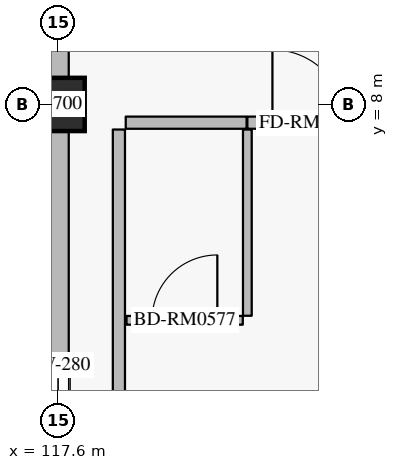
"""IFC4 building model, lengths in metres.
Left out: names, types, materials, properties, quantities, classifications, styles, units other than length and angle.
Written with IfcOpenShell. Run it as: python <this file> out.ifc"""

import sys

from ifc_helpers import new_model, si_unit, direction, frame, frame_2d, origin, origin_2d, place, context, subcontext, project, spatial, rectangle, extrude, element, fill, save


model = new_model("IFC4")
c1 = context("Model", 3, precision=1e-05, world=origin(), true_north=direction((0.0, 1.0)))
c2 = subcontext(c1, "Body", "Model", "MODEL_VIEW")
j1 = project(units=[si_unit("LENGTHUNIT", "METRE"), si_unit("PLANEANGLEUNIT", "RADIAN")], contexts=[c1])
p1 = place(None, origin())
s1 = spatial("IfcSite", under=j1, at=p1, CompositionType="ELEMENT")
p2 = place(p1, origin())
s2 = spatial("IfcBuilding", under=s1, at=p2, CompositionType="ELEMENT")
p3 = place(p2, frame((0.0, 0.0, 21.0)))
s3 = spatial("IfcBuildingStorey", under=s2, at=p3, CompositionType="ELEMENT", Elevation=21.0)
p4 = place(p3, frame((117.6, 8.0, 0.0), z_axis=(0.0, 0.0, 1.0), x_axis=(1.0, 0.0, 0.0)))
e1 = element("IfcColumn", 1, at=p4, inside=s3, PredefinedType="COLUMN", context=c2, shape_type="SweptSolid", body=[
    extrude(rectangle(XDim=0.7, YDim=0.7, at=origin_2d()), origin(), (0.0, 0.0, 1.0), 4.2),
])
p5 = place(p3, frame((117.6, 0.4, 0.0), z_axis=(0.0, 0.0, 1.0), x_axis=(0.0, 1.0, 0.0)))
e2 = element("IfcWall", 2, at=p5, inside=s3, PredefinedType="SOLIDWALL", context=c2, shape_type="SweptSolid", body=[
    extrude(rectangle(XDim=7.25, YDim=0.28, at=frame_2d((3.625, 0.0))), origin(), (0.0, 0.0, 1.0), 3.3),
])
p6 = place(p5, frame((2.975, 0.0, 0.75)))
e3 = element("IfcOpeningElement", 3, at=p6, cuts=e2, PredefinedType="OPENING", context=c2, shape_type="SweptSolid", body=[
    extrude(rectangle(XDim=1.3, YDim=1.65, at=frame_2d((0.65, 0.825))), frame((0.0, 0.15, 0.0), z_axis=(0.0, -1.0, 0.0), x_axis=(1.0, 0.0, 0.0)), (0.0, 0.0, 1.0), 0.3),
])
p7 = place(p3, frame((117.6, 8.35, 0.0), z_axis=(0.0, 0.0, 1.0), x_axis=(0.0, 1.0, 0.0)))
e4 = element("IfcWall", 4, at=p7, inside=s3, PredefinedType="SOLIDWALL", context=c2, shape_type="SweptSolid", body=[
    extrude(rectangle(XDim=7.2, YDim=0.28, at=frame_2d((3.6, 0.0))), origin(), (0.0, 0.0, 1.0), 3.3),
])
p8 = place(p7, frame((2.95, 0.0, 0.75)))
e5 = element("IfcOpeningElement", 5, at=p8, cuts=e4, PredefinedType="OPENING", context=c2, shape_type="SweptSolid", body=[
    extrude(rectangle(XDim=1.3, YDim=1.65, at=frame_2d((0.65, 0.825))), frame((0.0, 0.15, 0.0), z_axis=(0.0, -1.0, 0.0), x_axis=(1.0, 0.0, 0.0)), (0.0, 0.0, 1.0), 0.3),
])
p9 = place(p3, frame((118.49, 7.76, 0.0), z_axis=(0.0, 0.0, 1.0), x_axis=(1.0, 0.0, 0.0)))
e6 = element("IfcWall", 6, at=p9, inside=s3, PredefinedType="PARTITIONING", context=c2, shape_type="SweptSolid", body=[
    extrude(rectangle(XDim=1.59, YDim=0.16, at=frame_2d((0.795, 0.0))), origin(), (0.0, 0.0, 1.0), 3.965),
])
p10 = place(p3, frame((120.09, 7.76, 0.0), z_axis=(0.0, 0.0, 1.0), x_axis=(1.0, 0.0, 0.0)))
e7 = element("IfcWall", 7, at=p10, inside=s3, PredefinedType="PARTITIONING", context=c2, shape_type="SweptSolid", body=[
    extrude(rectangle(XDim=1.62, YDim=0.16, at=frame_2d((0.81, 0.0))), origin(), (0.0, 0.0, 1.0), 3.965),
])
p11 = place(p10, frame((0.33, 0.0, 0.0)))
e8 = element("IfcOpeningElement", 8, at=p11, cuts=e7, PredefinedType="OPENING", context=c2, shape_type="SweptSolid", body=[
    extrude(rectangle(XDim=0.96, YDim=2.2, at=frame_2d((0.48, 1.1))), frame((0.0, 0.09, 0.0), z_axis=(0.0, -1.0, 0.0), x_axis=(1.0, 0.0, 0.0)), (0.0, 0.0, 1.0), 0.18),
])
p12 = place(p3, frame((120.09, 5.22, 0.0), z_axis=(0.0, 0.0, 1.0), x_axis=(0.0, 1.0, 0.0)))
e9 = element("IfcWall", 9, at=p12, inside=s3, PredefinedType="PARTITIONING", context=c2, shape_type="SweptSolid", body=[
    extrude(rectangle(XDim=2.45, YDim=0.115, at=frame_2d((1.225, 0.0))), origin(), (0.0, 0.0, 1.0), 3.965),
])
p13 = place(p3, frame((118.5, 5.16, 0.0), z_axis=(0.0, 0.0, 1.0), x_axis=(1.0, 0.0, 0.0)))
e10 = element("IfcWall", 10, at=p13, inside=s3, PredefinedType="PARTITIONING", context=c2, shape_type="SweptSolid", body=[
    extrude(rectangle(XDim=1.53, YDim=0.115, at=frame_2d((0.765, 0.0))), origin(), (0.0, 0.0, 1.0), 3.965),
])
p14 = place(p13, frame((0.335, 0.0, 0.0)))
e11 = element("IfcOpeningElement", 11, at=p14, cuts=e10, PredefinedType="OPENING", context=c2, shape_type="SweptSolid", body=[
    extrude(rectangle(XDim=0.86, YDim=2.12, at=frame_2d((0.43, 1.06))), frame((0.0, 0.067, 0.0), z_axis=(0.0, -1.0, 0.0), x_axis=(1.0, 0.0, 0.0)), (0.0, 0.0, 1.0), 0.135),
])
p15 = place(p3, frame((118.4, 0.34, 0.0), z_axis=(0.0, 0.0, 1.0), x_axis=(0.0, 1.0, 0.0)))
e12 = element("IfcWall", 12, at=p15, inside=s3, PredefinedType="PARTITIONING", context=c2, shape_type="SweptSolid", body=[
    extrude(rectangle(XDim=7.33, YDim=0.16, at=frame_2d((3.665, 0.0))), origin(), (0.0, 0.0, 1.0), 3.965),
])
p16 = place(p6, origin())
e13 = element("IfcWindow", 13, at=p16, inside=s3, PartitioningType="SINGLE_PANEL", PredefinedType="WINDOW", context=c2, shape_type="SweptSolid", body=[
    extrude(rectangle(XDim=1.3, YDim=1.65, at=frame_2d((0.65, 0.825))), frame((0.0, 0.03, 0.0), z_axis=(0.0, -1.0, 0.0), x_axis=(1.0, 0.0, 0.0)), (0.0, 0.0, 1.0), 0.06),
])
fill(e3, e13)
p17 = place(p11, origin())
e14 = element("IfcDoor", 14, at=p17, inside=s3, OperationType="SINGLE_SWING_LEFT", PredefinedType="DOOR", context=c2, shape_type="SweptSolid", body=[
    extrude(rectangle(XDim=0.96, YDim=2.2, at=frame_2d((0.48, 1.1))), frame((0.0, 0.025, 0.0), z_axis=(0.0, -1.0, 0.0), x_axis=(1.0, 0.0, 0.0)), (0.0, 0.0, 1.0), 0.05),
])
fill(e8, e14)
p18 = place(p14, origin())
e15 = element("IfcDoor", 15, at=p18, inside=s3, OperationType="SINGLE_SWING_RIGHT", PredefinedType="DOOR", context=c2, shape_type="SweptSolid", body=[
    extrude(rectangle(XDim=0.86, YDim=2.12, at=frame_2d((0.43, 1.06))), frame((0.0, 0.025, 0.0), z_axis=(0.0, -1.0, 0.0), x_axis=(1.0, 0.0, 0.0)), (0.0, 0.0, 1.0), 0.05),
])
fill(e11, e15)
save(model, sys.argv[1])
